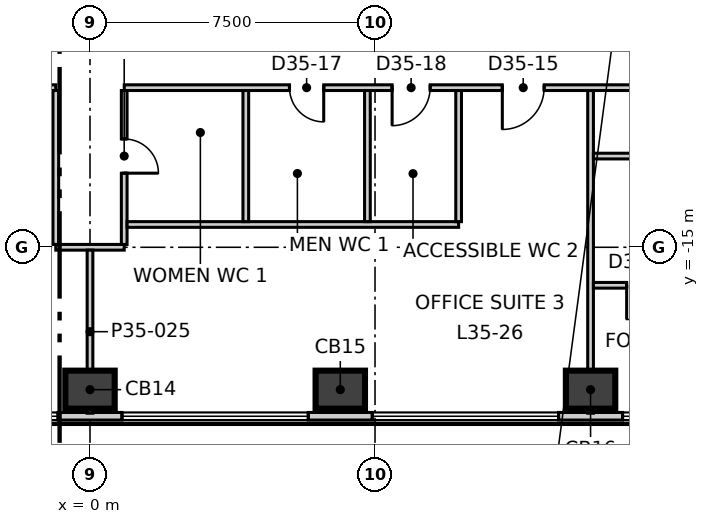
"""IFC4 building model, lengths in metres.
Left out: names, types, materials, properties, quantities, classifications, styles, units other than length and angle.
Written with IfcOpenShell. Run it as: python <this file> out.ifc"""

import sys

from ifc_helpers import new_model, si_unit, direction, frame, frame_2d, origin, origin_2d, place, context, subcontext, project, spatial, rectangle, extrude, element, fill, save


model = new_model("IFC4")
c1 = context("Model", 3, precision=1e-05, world=origin(), true_north=direction((0.0, 1.0)))
c2 = subcontext(c1, "Body", "Model", "MODEL_VIEW")
j1 = project(units=[si_unit("LENGTHUNIT", "METRE"), si_unit("PLANEANGLEUNIT", "RADIAN")], contexts=[c1])
p1 = place(None, origin())
s1 = spatial("IfcSite", under=j1, at=p1, CompositionType="ELEMENT")
p2 = place(p1, origin())
s2 = spatial("IfcBuilding", under=s1, at=p2, CompositionType="ELEMENT")
p3 = place(p2, frame((0.0, 0.0, 152.3)))
s3 = spatial("IfcBuildingStorey", under=s2, at=p3, CompositionType="ELEMENT", Elevation=152.3)
for number, where, z_axis, x_axis in (
    (1, (0.0, -18.746, -0.3), (0.0, 0.0, 1.0), (1.0, 0.0, 0.0)),
    (2, (6.586, -18.746, -0.3), (0.0, 0.0, 1.0), (1.0, 0.0, 0.0)),
    (3, (13.172, -18.746, -0.3), (0.0, 0.0, 1.0), (1.0, 0.0, 0.0)),
):
    element("IfcColumn", number, at=place(p3, frame(where, z_axis=z_axis, x_axis=x_axis)), inside=s3, PredefinedType="COLUMN", context=c2, shape_type="SweptSolid", body=[
        extrude(rectangle(XDim=1.3, YDim=1.0, at=origin_2d()), origin(), (0.0, 0.0, 1.0), 4.0),
    ])
p4 = place(p3, frame((-27.647, -19.446, 0.0), z_axis=(0.0, 0.0, 1.0), x_axis=(1.0, 0.0, 0.0)))
e4 = element("IfcWall", 4, at=p4, inside=s3, PredefinedType="ELEMENTEDWALL", context=c2, shape_type="SweptSolid", body=[
    extrude(rectangle(XDim=55.274, YDim=0.2, at=frame_2d((27.637, 0.0))), origin(), (0.0, 0.0, 1.0), 3.7),
])
p5 = place(p4, frame((2.146, 0.0, 0.9)))
e5 = element("IfcOpeningElement", 5, at=p5, cuts=e4, PredefinedType="OPENING", context=c2, shape_type="SweptSolid", body=[
    extrude(rectangle(XDim=4.9, YDim=2.5, at=frame_2d((2.45, 1.25))), frame((0.0, 0.11, 0.0), z_axis=(0.0, -1.0, 0.0), x_axis=(1.0, 0.0, 0.0)), (0.0, 0.0, 1.0), 0.22),
])
p6 = place(p4, frame((8.732, 0.0, 0.9)))
e6 = element("IfcOpeningElement", 6, at=p6, cuts=e4, PredefinedType="OPENING", context=c2, shape_type="SweptSolid", body=[
    extrude(rectangle(XDim=4.9, YDim=2.5, at=frame_2d((2.45, 1.25))), frame((0.0, 0.11, 0.0), z_axis=(0.0, -1.0, 0.0), x_axis=(1.0, 0.0, 0.0)), (0.0, 0.0, 1.0), 0.22),
])
p7 = place(p4, frame((15.318, 0.0, 0.9)))
e7 = element("IfcOpeningElement", 7, at=p7, cuts=e4, PredefinedType="OPENING", context=c2, shape_type="SweptSolid", body=[
    extrude(rectangle(XDim=4.9, YDim=2.5, at=frame_2d((2.45, 1.25))), frame((0.0, 0.11, 0.0), z_axis=(0.0, -1.0, 0.0), x_axis=(1.0, 0.0, 0.0)), (0.0, 0.0, 1.0), 0.22),
])
p8 = place(p4, frame((21.904, 0.0, 0.9)))
e8 = element("IfcOpeningElement", 8, at=p8, cuts=e4, PredefinedType="OPENING", context=c2, shape_type="SweptSolid", body=[
    extrude(rectangle(XDim=4.9, YDim=2.5, at=frame_2d((2.45, 1.25))), frame((0.0, 0.11, 0.0), z_axis=(0.0, -1.0, 0.0), x_axis=(1.0, 0.0, 0.0)), (0.0, 0.0, 1.0), 0.22),
])
p9 = place(p4, frame((28.49, 0.0, 0.9)))
e9 = element("IfcOpeningElement", 9, at=p9, cuts=e4, PredefinedType="OPENING", context=c2, shape_type="SweptSolid", body=[
    extrude(rectangle(XDim=4.9, YDim=2.5, at=frame_2d((2.45, 1.25))), frame((0.0, 0.11, 0.0), z_axis=(0.0, -1.0, 0.0), x_axis=(1.0, 0.0, 0.0)), (0.0, 0.0, 1.0), 0.22),
])
p10 = place(p4, frame((35.076, 0.0, 0.9)))
e10 = element("IfcOpeningElement", 10, at=p10, cuts=e4, PredefinedType="OPENING", context=c2, shape_type="SweptSolid", body=[
    extrude(rectangle(XDim=4.9, YDim=2.5, at=frame_2d((2.45, 1.25))), frame((0.0, 0.11, 0.0), z_axis=(0.0, -1.0, 0.0), x_axis=(1.0, 0.0, 0.0)), (0.0, 0.0, 1.0), 0.22),
])
p11 = place(p4, frame((41.662, 0.0, 0.9)))
e11 = element("IfcOpeningElement", 11, at=p11, cuts=e4, PredefinedType="OPENING", context=c2, shape_type="SweptSolid", body=[
    extrude(rectangle(XDim=4.9, YDim=2.5, at=frame_2d((2.45, 1.25))), frame((0.0, 0.11, 0.0), z_axis=(0.0, -1.0, 0.0), x_axis=(1.0, 0.0, 0.0)), (0.0, 0.0, 1.0), 0.22),
])
p12 = place(p4, frame((48.248, 0.0, 0.9)))
e12 = element("IfcOpeningElement", 12, at=p12, cuts=e4, PredefinedType="OPENING", context=c2, shape_type="SweptSolid", body=[
    extrude(rectangle(XDim=4.9, YDim=2.5, at=frame_2d((2.45, 1.25))), frame((0.0, 0.11, 0.0), z_axis=(0.0, -1.0, 0.0), x_axis=(1.0, 0.0, 0.0)), (0.0, 0.0, 1.0), 0.22),
])
p13 = place(p3, frame((30.664, -14.22, 0.0), z_axis=(0.0, 0.0, 1.0), x_axis=(-0.499984613623, 0.866034286931, 0.0)))
e13 = element("IfcWall", 13, at=p13, inside=s3, PredefinedType="ELEMENTEDWALL", context=c2, shape_type="SweptSolid", body=[
    extrude(rectangle(XDim=55.274, YDim=0.2, at=frame_2d((27.637, 0.0))), origin(), (0.0, 0.0, 1.0), 3.7),
])
p14 = place(p13, frame((2.146, 0.0, 0.9)))
e14 = element("IfcOpeningElement", 14, at=p14, cuts=e13, PredefinedType="OPENING", context=c2, shape_type="SweptSolid", body=[
    extrude(rectangle(XDim=4.9, YDim=2.5, at=frame_2d((2.45, 1.25))), frame((0.0, 0.11, 0.0), z_axis=(0.0, -1.0, 0.0), x_axis=(1.0, 0.0, 0.0)), (0.0, 0.0, 1.0), 0.22),
])
p15 = place(p13, frame((8.732, 0.0, 0.9)))
e15 = element("IfcOpeningElement", 15, at=p15, cuts=e13, PredefinedType="OPENING", context=c2, shape_type="SweptSolid", body=[
    extrude(rectangle(XDim=4.9, YDim=2.5, at=frame_2d((2.45, 1.25))), frame((0.0, 0.11, 0.0), z_axis=(0.0, -1.0, 0.0), x_axis=(1.0, 0.0, 0.0)), (0.0, 0.0, 1.0), 0.22),
])
p16 = place(p13, frame((15.318, 0.0, 0.9)))
e16 = element("IfcOpeningElement", 16, at=p16, cuts=e13, PredefinedType="OPENING", context=c2, shape_type="SweptSolid", body=[
    extrude(rectangle(XDim=4.9, YDim=2.5, at=frame_2d((2.45, 1.25))), frame((0.0, 0.11, 0.0), z_axis=(0.0, -1.0, 0.0), x_axis=(1.0, 0.0, 0.0)), (0.0, 0.0, 1.0), 0.22),
])
p17 = place(p13, frame((21.904, 0.0, 0.9)))
e17 = element("IfcOpeningElement", 17, at=p17, cuts=e13, PredefinedType="OPENING", context=c2, shape_type="SweptSolid", body=[
    extrude(rectangle(XDim=4.9, YDim=2.5, at=frame_2d((2.45, 1.25))), frame((0.0, 0.11, 0.0), z_axis=(0.0, -1.0, 0.0), x_axis=(1.0, 0.0, 0.0)), (0.0, 0.0, 1.0), 0.22),
])
p18 = place(p13, frame((28.49, 0.0, 0.9)))
e18 = element("IfcOpeningElement", 18, at=p18, cuts=e13, PredefinedType="OPENING", context=c2, shape_type="SweptSolid", body=[
    extrude(rectangle(XDim=4.9, YDim=2.5, at=frame_2d((2.45, 1.25))), frame((0.0, 0.11, 0.0), z_axis=(0.0, -1.0, 0.0), x_axis=(1.0, 0.0, 0.0)), (0.0, 0.0, 1.0), 0.22),
])
p19 = place(p13, frame((35.076, 0.0, 0.9)))
e19 = element("IfcOpeningElement", 19, at=p19, cuts=e13, PredefinedType="OPENING", context=c2, shape_type="SweptSolid", body=[
    extrude(rectangle(XDim=4.9, YDim=2.5, at=frame_2d((2.45, 1.25))), frame((0.0, 0.11, 0.0), z_axis=(0.0, -1.0, 0.0), x_axis=(1.0, 0.0, 0.0)), (0.0, 0.0, 1.0), 0.22),
])
p20 = place(p13, frame((41.662, 0.0, 0.9)))
e20 = element("IfcOpeningElement", 20, at=p20, cuts=e13, PredefinedType="OPENING", context=c2, shape_type="SweptSolid", body=[
    extrude(rectangle(XDim=4.9, YDim=2.5, at=frame_2d((2.45, 1.25))), frame((0.0, 0.11, 0.0), z_axis=(0.0, -1.0, 0.0), x_axis=(1.0, 0.0, 0.0)), (0.0, 0.0, 1.0), 0.22),
])
p21 = place(p13, frame((48.248, 0.0, 0.9)))
e21 = element("IfcOpeningElement", 21, at=p21, cuts=e13, PredefinedType="OPENING", context=c2, shape_type="SweptSolid", body=[
    extrude(rectangle(XDim=4.9, YDim=2.5, at=frame_2d((2.45, 1.25))), frame((0.0, 0.11, 0.0), z_axis=(0.0, -1.0, 0.0), x_axis=(1.0, 0.0, 0.0)), (0.0, 0.0, 1.0), 0.22),
])
p22 = place(p3, frame((-18.556, -10.8, 0.0), z_axis=(0.0, 0.0, 1.0), x_axis=(1.0, 0.0, 0.0)))
e22 = element("IfcWall", 22, at=p22, inside=s3, PredefinedType="PARTITIONING", context=c2, shape_type="SweptSolid", body=[
    extrude(rectangle(XDim=17.655, YDim=0.15, at=frame_2d((8.828, 0.0))), origin(), (0.0, 0.0, 1.0), 3.7),
])
p23 = place(p22, frame((2.1, 0.0, 0.0)))
e23 = element("IfcOpeningElement", 23, at=p23, cuts=e22, PredefinedType="OPENING", context=c2, shape_type="SweptSolid", body=[
    extrude(rectangle(XDim=1.1, YDim=2.1, at=frame_2d((0.55, 1.05))), frame((0.0, 0.085, 0.0), z_axis=(0.0, -1.0, 0.0), x_axis=(1.0, 0.0, 0.0)), (0.0, 0.0, 1.0), 0.17),
])
p24 = place(p22, frame((13.934, 0.0, 0.0)))
e24 = element("IfcOpeningElement", 24, at=p24, cuts=e22, PredefinedType="OPENING", context=c2, shape_type="SweptSolid", body=[
    extrude(rectangle(XDim=1.1, YDim=2.1, at=frame_2d((0.55, 1.05))), frame((0.0, 0.085, 0.0), z_axis=(0.0, -1.0, 0.0), x_axis=(1.0, 0.0, 0.0)), (0.0, 0.0, 1.0), 0.17),
])
p25 = place(p22, frame((6.734, 0.0, 0.0)))
e25 = element("IfcOpeningElement", 25, at=p25, cuts=e22, PredefinedType="OPENING", context=c2, shape_type="SweptSolid", body=[
    extrude(rectangle(XDim=0.9, YDim=2.1, at=frame_2d((0.45, 1.05))), frame((0.0, 0.085, 0.0), z_axis=(0.0, -1.0, 0.0), x_axis=(1.0, 0.0, 0.0)), (0.0, 0.0, 1.0), 0.17),
])
p26 = place(p22, frame((9.734, 0.0, 0.0)))
e26 = element("IfcOpeningElement", 26, at=p26, cuts=e22, PredefinedType="OPENING", context=c2, shape_type="SweptSolid", body=[
    extrude(rectangle(XDim=0.9, YDim=2.1, at=frame_2d((0.45, 1.05))), frame((0.0, 0.085, 0.0), z_axis=(0.0, -1.0, 0.0), x_axis=(1.0, 0.0, 0.0)), (0.0, 0.0, 1.0), 0.17),
])
p27 = place(p3, frame((0.901, -10.8, 0.0), z_axis=(0.0, 0.0, 1.0), x_axis=(1.0, 0.0, 0.0)))
e27 = element("IfcWall", 27, at=p27, inside=s3, PredefinedType="PARTITIONING", context=c2, shape_type="SweptSolid", body=[
    extrude(rectangle(XDim=17.805, YDim=0.15, at=frame_2d((8.903, 0.0))), origin(), (0.0, 0.0, 1.0), 3.7),
])
p28 = place(p27, frame((9.949, 0.0, 0.0)))
e28 = element("IfcOpeningElement", 28, at=p28, cuts=e27, PredefinedType="OPENING", context=c2, shape_type="SweptSolid", body=[
    extrude(rectangle(XDim=1.1, YDim=2.1, at=frame_2d((0.55, 1.05))), frame((0.0, 0.085, 0.0), z_axis=(0.0, -1.0, 0.0), x_axis=(1.0, 0.0, 0.0)), (0.0, 0.0, 1.0), 0.17),
])
p29 = place(p27, frame((4.349, 0.0, 0.0)))
e29 = element("IfcOpeningElement", 29, at=p29, cuts=e27, PredefinedType="OPENING", context=c2, shape_type="SweptSolid", body=[
    extrude(rectangle(XDim=0.9, YDim=2.1, at=frame_2d((0.45, 1.05))), frame((0.0, 0.085, 0.0), z_axis=(0.0, -1.0, 0.0), x_axis=(1.0, 0.0, 0.0)), (0.0, 0.0, 1.0), 0.17),
])
p30 = place(p27, frame((7.049, 0.0, 0.0)))
e30 = element("IfcOpeningElement", 30, at=p30, cuts=e27, PredefinedType="OPENING", context=c2, shape_type="SweptSolid", body=[
    extrude(rectangle(XDim=1.0, YDim=2.1, at=frame_2d((0.5, 1.05))), frame((0.0, 0.085, 0.0), z_axis=(0.0, -1.0, 0.0), x_axis=(1.0, 0.0, 0.0)), (0.0, 0.0, 1.0), 0.17),
])
p31 = place(p27, frame((14.521, 0.0, 0.0)))
e31 = element("IfcOpeningElement", 31, at=p31, cuts=e27, PredefinedType="OPENING", context=c2, shape_type="SweptSolid", body=[
    extrude(rectangle(XDim=1.1, YDim=2.1, at=frame_2d((0.55, 1.05))), frame((0.0, 0.085, 0.0), z_axis=(0.0, -1.0, 0.0), x_axis=(1.0, 0.0, 0.0)), (0.0, 0.0, 1.0), 0.17),
])
p32 = place(p3, frame((-0.9, -15.0, 0.0), z_axis=(0.0, 0.0, 1.0), x_axis=(1.0, 0.0, 0.0)))
e32 = element("IfcWall", 32, at=p32, inside=s3, PredefinedType="PARTITIONING", context=c2, shape_type="SweptSolid", body=[
    extrude(rectangle(XDim=1.8, YDim=0.15, at=frame_2d((0.9, 0.0))), origin(), (0.0, 0.0, 1.0), 3.7),
])
p33 = place(p3, frame((-0.9, -14.925, 0.0), z_axis=(0.0, 0.0, 1.0), x_axis=(0.0, 1.0, 0.0)))
e33 = element("IfcWall", 33, at=p33, inside=s3, PredefinedType="PARTITIONING", context=c2, shape_type="SweptSolid", body=[
    extrude(rectangle(XDim=4.049, YDim=0.15, at=frame_2d((2.024, 0.0))), origin(), (0.0, 0.0, 1.0), 3.7),
])
p34 = place(p3, frame((0.0, -19.366, 0.0), z_axis=(0.0, 0.0, 1.0), x_axis=(0.0, 1.0, 0.0)))
e34 = element("IfcWall", 34, at=p34, inside=s3, PredefinedType="PARTITIONING", context=c2, shape_type="SweptSolid", body=[
    extrude(rectangle(XDim=4.291, YDim=0.15, at=frame_2d((2.146, 0.0))), origin(), (0.0, 0.0, 1.0), 3.2),
])
p35 = place(p3, frame((0.9, -14.925, 0.0), z_axis=(0.0, 0.0, 1.0), x_axis=(0.0, 1.0, 0.0)))
e35 = element("IfcWall", 35, at=p35, inside=s3, PredefinedType="PARTITIONING", context=c2, shape_type="SweptSolid", body=[
    extrude(rectangle(XDim=4.049, YDim=0.15, at=frame_2d((2.024, 0.0))), origin(), (0.0, 0.0, 1.0), 3.7),
])
p36 = place(p35, frame((1.875, 0.0, 0.0)))
e36 = element("IfcOpeningElement", 36, at=p36, cuts=e35, PredefinedType="OPENING", context=c2, shape_type="SweptSolid", body=[
    extrude(rectangle(XDim=0.9, YDim=2.1, at=frame_2d((0.45, 1.05))), frame((0.0, 0.085, 0.0), z_axis=(0.0, -1.0, 0.0), x_axis=(1.0, 0.0, 0.0)), (0.0, 0.0, 1.0), 0.17),
])
p37 = place(p3, frame((9.803, 4.62, 0.0), z_axis=(0.0, 0.0, 1.0), x_axis=(0.500017706633, -0.866015180614, 0.0)))
e37 = element("IfcWall", 37, at=p37, inside=s3, PredefinedType="PARTITIONING", context=c2, shape_type="SweptSolid", body=[
    extrude(rectangle(XDim=17.656, YDim=0.15, at=frame_2d((8.828, 0.0))), origin(), (0.0, 0.0, 1.0), 3.7),
])
p38 = place(p37, frame((14.456, 0.0, 0.0)))
e38 = element("IfcOpeningElement", 38, at=p38, cuts=e37, PredefinedType="OPENING", context=c2, shape_type="SweptSolid", body=[
    extrude(rectangle(XDim=1.1, YDim=2.1, at=frame_2d((0.55, 1.05))), frame((0.0, 0.085, 0.0), z_axis=(0.0, -1.0, 0.0), x_axis=(1.0, 0.0, 0.0)), (0.0, 0.0, 1.0), 0.17),
])
p39 = place(p37, frame((4.321, 0.0, 0.0)))
e39 = element("IfcOpeningElement", 39, at=p39, cuts=e37, PredefinedType="OPENING", context=c2, shape_type="SweptSolid", body=[
    extrude(rectangle(XDim=1.1, YDim=2.1, at=frame_2d((0.55, 1.05))), frame((0.0, 0.085, 0.0), z_axis=(0.0, -1.0, 0.0), x_axis=(1.0, 0.0, 0.0)), (0.0, 0.0, 1.0), 0.17),
])
p40 = place(p37, frame((10.521, 0.0, 0.0)))
e40 = element("IfcOpeningElement", 40, at=p40, cuts=e37, PredefinedType="OPENING", context=c2, shape_type="SweptSolid", body=[
    extrude(rectangle(XDim=0.9, YDim=2.1, at=frame_2d((0.45, 1.05))), frame((0.0, 0.085, 0.0), z_axis=(0.0, -1.0, 0.0), x_axis=(1.0, 0.0, 0.0)), (0.0, 0.0, 1.0), 0.17),
])
p41 = place(p37, frame((8.121, 0.0, 0.0)))
e41 = element("IfcOpeningElement", 41, at=p41, cuts=e37, PredefinedType="OPENING", context=c2, shape_type="SweptSolid", body=[
    extrude(rectangle(XDim=0.9, YDim=2.1, at=frame_2d((0.45, 1.05))), frame((0.0, 0.085, 0.0), z_axis=(0.0, -1.0, 0.0), x_axis=(1.0, 0.0, 0.0)), (0.0, 0.0, 1.0), 0.17),
])
p42 = place(p3, frame((0.975, -14.4, 0.0), z_axis=(0.0, 0.0, 1.0), x_axis=(1.0, 0.0, 0.0)))
e42 = element("IfcWall", 42, at=p42, inside=s3, PredefinedType="PARTITIONING", context=c2, shape_type="SweptSolid", body=[
    extrude(rectangle(XDim=8.725, YDim=0.15, at=frame_2d((4.362, 0.0))), origin(), (0.0, 0.0, 1.0), 3.7),
])
for number, where, z_axis, x_axis in (
    (43, (4.1, -14.325, 0.0), (0.0, 0.0, 1.0), (0.0, 1.0, 0.0)),
    (44, (9.7, -14.325, 0.0), (0.0, 0.0, 1.0), (0.0, 1.0, 0.0)),
    (45, (7.3, -14.325, 0.0), (0.0, 0.0, 1.0), (0.0, 1.0, 0.0)),
):
    element("IfcWall", number, at=place(p3, frame(where, z_axis=z_axis, x_axis=x_axis)), inside=s3, PredefinedType="PARTITIONING", context=c2, shape_type="SweptSolid", body=[
        extrude(rectangle(XDim=3.45, YDim=0.15, at=frame_2d((1.725, 0.0))), origin(), (0.0, 0.0, 1.0), 3.7),
    ])
p43 = place(p3, frame((13.172, -19.366, 0.0), z_axis=(0.0, 0.0, 1.0), x_axis=(0.0, 1.0, 0.0)))
e46 = element("IfcWall", 46, at=p43, inside=s3, PredefinedType="PARTITIONING", context=c2, shape_type="SweptSolid", body=[
    extrude(rectangle(XDim=8.491, YDim=0.15, at=frame_2d((4.246, 0.0))), origin(), (0.0, 0.0, 1.0), 3.7),
])
p44 = place(p3, frame((13.247, -16.0, 0.0), z_axis=(0.0, 0.0, 1.0), x_axis=(1.0, 0.0, 0.0)))
e47 = element("IfcWall", 47, at=p44, inside=s3, PredefinedType="PARTITIONING", context=c2, shape_type="SweptSolid", body=[
    extrude(rectangle(XDim=5.525, YDim=0.15, at=frame_2d((2.762, 0.0))), origin(), (0.0, 0.0, 1.0), 3.7),
])
p45 = place(p44, frame((0.875, 0.0, 0.0)))
e48 = element("IfcOpeningElement", 48, at=p45, cuts=e47, PredefinedType="OPENING", context=c2, shape_type="SweptSolid", body=[
    extrude(rectangle(XDim=0.9, YDim=2.1, at=frame_2d((0.45, 1.05))), frame((0.0, 0.085, 0.0), z_axis=(0.0, -1.0, 0.0), x_axis=(1.0, 0.0, 0.0)), (0.0, 0.0, 1.0), 0.17),
])
p46 = place(p3, frame((13.247, -12.6, 0.0), z_axis=(0.0, 0.0, 1.0), x_axis=(1.0, 0.0, 0.0)))
e49 = element("IfcWall", 49, at=p46, inside=s3, PredefinedType="PARTITIONING", context=c2, shape_type="SweptSolid", body=[
    extrude(rectangle(XDim=5.525, YDim=0.15, at=frame_2d((2.762, 0.0))), origin(), (0.0, 0.0, 1.0), 3.7),
])
p47 = place(p8, origin())
e50 = element("IfcWindow", 50, at=p47, inside=s3, PartitioningType="SINGLE_PANEL", PredefinedType="WINDOW", context=c2, shape_type="SweptSolid", body=[
    extrude(rectangle(XDim=4.9, YDim=2.5, at=frame_2d((2.45, 1.25))), frame((0.0, 0.03, 0.0), z_axis=(0.0, -1.0, 0.0), x_axis=(1.0, 0.0, 0.0)), (0.0, 0.0, 1.0), 0.06),
])
fill(e8, e50)
p48 = place(p9, origin())
e51 = element("IfcWindow", 51, at=p48, inside=s3, PartitioningType="SINGLE_PANEL", PredefinedType="WINDOW", context=c2, shape_type="SweptSolid", body=[
    extrude(rectangle(XDim=4.9, YDim=2.5, at=frame_2d((2.45, 1.25))), frame((0.0, 0.03, 0.0), z_axis=(0.0, -1.0, 0.0), x_axis=(1.0, 0.0, 0.0)), (0.0, 0.0, 1.0), 0.06),
])
fill(e9, e51)
p49 = place(p10, origin())
e52 = element("IfcWindow", 52, at=p49, inside=s3, PartitioningType="SINGLE_PANEL", PredefinedType="WINDOW", context=c2, shape_type="SweptSolid", body=[
    extrude(rectangle(XDim=4.9, YDim=2.5, at=frame_2d((2.45, 1.25))), frame((0.0, 0.03, 0.0), z_axis=(0.0, -1.0, 0.0), x_axis=(1.0, 0.0, 0.0)), (0.0, 0.0, 1.0), 0.06),
])
fill(e10, e52)
p50 = place(p11, origin())
e53 = element("IfcWindow", 53, at=p50, inside=s3, PartitioningType="SINGLE_PANEL", PredefinedType="WINDOW", context=c2, shape_type="SweptSolid", body=[
    extrude(rectangle(XDim=4.9, YDim=2.5, at=frame_2d((2.45, 1.25))), frame((0.0, 0.03, 0.0), z_axis=(0.0, -1.0, 0.0), x_axis=(1.0, 0.0, 0.0)), (0.0, 0.0, 1.0), 0.06),
])
fill(e11, e53)
p51 = place(p28, origin())
e54 = element("IfcDoor", 54, at=p51, inside=s3, OperationType="SINGLE_SWING_LEFT", PredefinedType="DOOR", context=c2, shape_type="SweptSolid", body=[
    extrude(rectangle(XDim=1.1, YDim=2.1, at=frame_2d((0.55, 1.05))), frame((0.0, 0.025, 0.0), z_axis=(0.0, -1.0, 0.0), x_axis=(1.0, 0.0, 0.0)), (0.0, 0.0, 1.0), 0.05),
])
fill(e28, e54)
p52 = place(p36, origin())
e55 = element("IfcDoor", 55, at=p52, inside=s3, OperationType="SINGLE_SWING_LEFT", PredefinedType="DOOR", context=c2, shape_type="SweptSolid", body=[
    extrude(rectangle(XDim=0.9, YDim=2.1, at=frame_2d((0.45, 1.05))), frame((0.0, 0.025, 0.0), z_axis=(0.0, -1.0, 0.0), x_axis=(1.0, 0.0, 0.0)), (0.0, 0.0, 1.0), 0.05),
])
fill(e36, e55)
p53 = place(p29, origin())
e56 = element("IfcDoor", 56, at=p53, inside=s3, OperationType="SINGLE_SWING_RIGHT", PredefinedType="DOOR", context=c2, shape_type="SweptSolid", body=[
    extrude(rectangle(XDim=0.9, YDim=2.1, at=frame_2d((0.45, 1.05))), frame((0.0, 0.025, 0.0), z_axis=(0.0, -1.0, 0.0), x_axis=(1.0, 0.0, 0.0)), (0.0, 0.0, 1.0), 0.05),
])
fill(e29, e56)
p54 = place(p30, origin())
e57 = element("IfcDoor", 57, at=p54, inside=s3, OperationType="SINGLE_SWING_LEFT", PredefinedType="DOOR", context=c2, shape_type="SweptSolid", body=[
    extrude(rectangle(XDim=1.0, YDim=2.1, at=frame_2d((0.5, 1.05))), frame((0.0, 0.025, 0.0), z_axis=(0.0, -1.0, 0.0), x_axis=(1.0, 0.0, 0.0)), (0.0, 0.0, 1.0), 0.05),
])
fill(e30, e57)
p55 = place(p45, origin())
e58 = element("IfcDoor", 58, at=p55, inside=s3, OperationType="SINGLE_SWING_LEFT", PredefinedType="DOOR", context=c2, shape_type="SweptSolid", body=[
    extrude(rectangle(XDim=0.9, YDim=2.1, at=frame_2d((0.45, 1.05))), frame((0.0, 0.025, 0.0), z_axis=(0.0, -1.0, 0.0), x_axis=(1.0, 0.0, 0.0)), (0.0, 0.0, 1.0), 0.05),
])
fill(e48, e58)
save(model, sys.argv[1])
